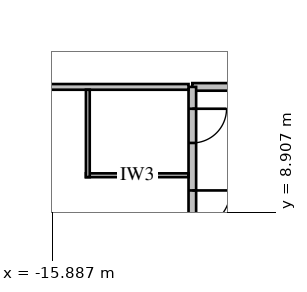
"""IFC4 building model, lengths in metres.
Left out: names, types, materials, properties, quantities, classifications, styles, units other than length and angle.
Written with IfcOpenShell. Run it as: python <this file> out.ifc"""

import sys

from ifc_helpers import new_model, si_unit, direction, frame, frame_2d, origin, place, context, subcontext, project, spatial, rectangle, extrude, element, fill, save


model = new_model("IFC4")
c1 = context("Model", 3, precision=1e-05, world=origin(), true_north=direction((0.0, 1.0)))
c2 = subcontext(c1, "Body", "Model", "MODEL_VIEW")
j1 = project(units=[si_unit("LENGTHUNIT", "METRE"), si_unit("PLANEANGLEUNIT", "RADIAN")], contexts=[c1])
p1 = place(None, origin())
s1 = spatial("IfcSite", under=j1, at=p1, CompositionType="ELEMENT")
p2 = place(p1, origin())
s2 = spatial("IfcBuilding", under=s1, at=p2, CompositionType="ELEMENT")
p3 = place(p2, origin())
s3 = spatial("IfcBuildingStorey", under=s2, at=p3, CompositionType="ELEMENT", Elevation=0.0)
p4 = place(p3, frame((12.2, 12.2, 0.0), z_axis=(0.0, 0.0, 1.0), x_axis=(-1.0, 0.0, 0.0)))
e1 = element("IfcWall", 1, at=p4, inside=s3, PredefinedType="PARTITIONING", context=c2, shape_type="SweptSolid", body=[
    extrude(rectangle(XDim=24.4, YDim=0.2, at=frame_2d((12.2, 0.0))), origin(), (0.0, 0.0, 1.0), 5.188),
])
p5 = place(p4, frame((6.664, 0.0, 0.0)))
e2 = element("IfcOpeningElement", 2, at=p5, cuts=e1, PredefinedType="OPENING", context=c2, shape_type="SweptSolid", body=[
    extrude(rectangle(XDim=1.8, YDim=2.4, at=frame_2d((0.9, 1.2))), frame((0.0, 0.12, 0.0), z_axis=(0.0, -1.0, 0.0), x_axis=(1.0, 0.0, 0.0)), (0.0, 0.0, 1.0), 0.24),
])
p6 = place(p4, frame((19.264, 0.0, 0.0)))
e3 = element("IfcOpeningElement", 3, at=p6, cuts=e1, PredefinedType="OPENING", context=c2, shape_type="SweptSolid", body=[
    extrude(rectangle(XDim=1.0, YDim=2.1, at=frame_2d((0.5, 1.05))), frame((0.0, 0.12, 0.0), z_axis=(0.0, -1.0, 0.0), x_axis=(1.0, 0.0, 0.0)), (0.0, 0.0, 1.0), 0.24),
])
p7 = place(p3, frame((-12.2, 12.2, 0.0), z_axis=(0.0, 0.0, 1.0), x_axis=(0.0, -1.0, 0.0)))
e4 = element("IfcWall", 4, at=p7, inside=s3, PredefinedType="PARTITIONING", context=c2, shape_type="SweptSolid", body=[
    extrude(rectangle(XDim=24.4, YDim=0.2, at=frame_2d((12.2, 0.0))), origin(), (0.0, 0.0, 1.0), 5.8),
])
p8 = place(p7, frame((0.575, 0.0, 0.0)))
e5 = element("IfcOpeningElement", 5, at=p8, cuts=e4, PredefinedType="OPENING", context=c2, shape_type="SweptSolid", body=[
    extrude(rectangle(XDim=0.9, YDim=2.1, at=frame_2d((0.45, 1.05))), frame((0.0, 0.12, 0.0), z_axis=(0.0, -1.0, 0.0), x_axis=(1.0, 0.0, 0.0)), (0.0, 0.0, 1.0), 0.24),
])
p9 = place(p7, frame((2.725, 0.0, 0.0)))
e6 = element("IfcOpeningElement", 6, at=p9, cuts=e4, PredefinedType="OPENING", context=c2, shape_type="SweptSolid", body=[
    extrude(rectangle(XDim=1.0, YDim=2.1, at=frame_2d((0.5, 1.05))), frame((0.0, 0.12, 0.0), z_axis=(0.0, -1.0, 0.0), x_axis=(1.0, 0.0, 0.0)), (0.0, 0.0, 1.0), 0.24),
])
p10 = place(p7, frame((7.7, 0.0, 0.0)))
e7 = element("IfcOpeningElement", 7, at=p10, cuts=e4, PredefinedType="OPENING", context=c2, shape_type="SweptSolid", body=[
    extrude(rectangle(XDim=1.0, YDim=2.1, at=frame_2d((0.5, 1.05))), frame((0.0, 0.12, 0.0), z_axis=(0.0, -1.0, 0.0), x_axis=(1.0, 0.0, 0.0)), (0.0, 0.0, 1.0), 0.24),
])
p11 = place(p7, frame((15.7, 0.0, 0.0)))
e8 = element("IfcOpeningElement", 8, at=p11, cuts=e4, PredefinedType="OPENING", context=c2, shape_type="SweptSolid", body=[
    extrude(rectangle(XDim=1.0, YDim=2.1, at=frame_2d((0.5, 1.05))), frame((0.0, 0.12, 0.0), z_axis=(0.0, -1.0, 0.0), x_axis=(1.0, 0.0, 0.0)), (0.0, 0.0, 1.0), 0.24),
])
p12 = place(p7, frame((21.398, 0.0, 0.0)))
e9 = element("IfcOpeningElement", 9, at=p12, cuts=e4, PredefinedType="OPENING", context=c2, shape_type="SweptSolid", body=[
    extrude(rectangle(XDim=1.8, YDim=2.4, at=frame_2d((0.9, 1.2))), frame((0.0, 0.12, 0.0), z_axis=(0.0, -1.0, 0.0), x_axis=(1.0, 0.0, 0.0)), (0.0, 0.0, 1.0), 0.24),
])
p13 = place(p3, frame((-12.3, 12.2, 0.0), z_axis=(0.0, 0.0, 1.0), x_axis=(-1.0, 0.0, 0.0)))
e10 = element("IfcWall", 10, at=p13, inside=s3, PredefinedType="PARTITIONING", context=c2, shape_type="SweptSolid", body=[
    extrude(rectangle(XDim=15.55, YDim=0.15, at=frame_2d((7.775, 0.0))), origin(), (0.0, 0.0, 1.0), 5.188),
])
p14 = place(p3, frame((-12.3, 9.875, 0.0), z_axis=(0.0, 0.0, 1.0), x_axis=(-1.0, 0.0, 0.0)))
e11 = element("IfcWall", 11, at=p14, inside=s3, PredefinedType="PARTITIONING", context=c2, shape_type="SweptSolid", body=[
    extrude(rectangle(XDim=2.7, YDim=0.1, at=frame_2d((1.35, 0.0))), origin(), (0.0, 0.0, 1.0), 5.8),
])
p15 = place(p3, frame((-14.95, 12.125, 0.0), z_axis=(0.0, 0.0, 1.0), x_axis=(0.0, -1.0, 0.0)))
e12 = element("IfcWall", 12, at=p15, inside=s3, PredefinedType="PARTITIONING", context=c2, shape_type="SweptSolid", body=[
    extrude(rectangle(XDim=2.3, YDim=0.1, at=frame_2d((1.15, 0.0))), origin(), (0.0, 0.0, 1.0), 5.8),
])
p16 = place(p8, origin())
e13 = element("IfcDoor", 13, at=p16, inside=s3, OperationType="SINGLE_SWING_LEFT", PredefinedType="DOOR", context=c2, shape_type="SweptSolid", body=[
    extrude(rectangle(XDim=0.9, YDim=2.1, at=frame_2d((0.45, 1.05))), frame((0.0, 0.025, 0.0), z_axis=(0.0, -1.0, 0.0), x_axis=(1.0, 0.0, 0.0)), (0.0, 0.0, 1.0), 0.05),
])
fill(e5, e13)
p17 = place(p9, origin())
e14 = element("IfcDoor", 14, at=p17, inside=s3, OperationType="SINGLE_SWING_LEFT", PredefinedType="DOOR", context=c2, shape_type="SweptSolid", body=[
    extrude(rectangle(XDim=1.0, YDim=2.1, at=frame_2d((0.5, 1.05))), frame((0.0, 0.025, 0.0), z_axis=(0.0, -1.0, 0.0), x_axis=(1.0, 0.0, 0.0)), (0.0, 0.0, 1.0), 0.05),
])
fill(e6, e14)
save(model, sys.argv[1])
